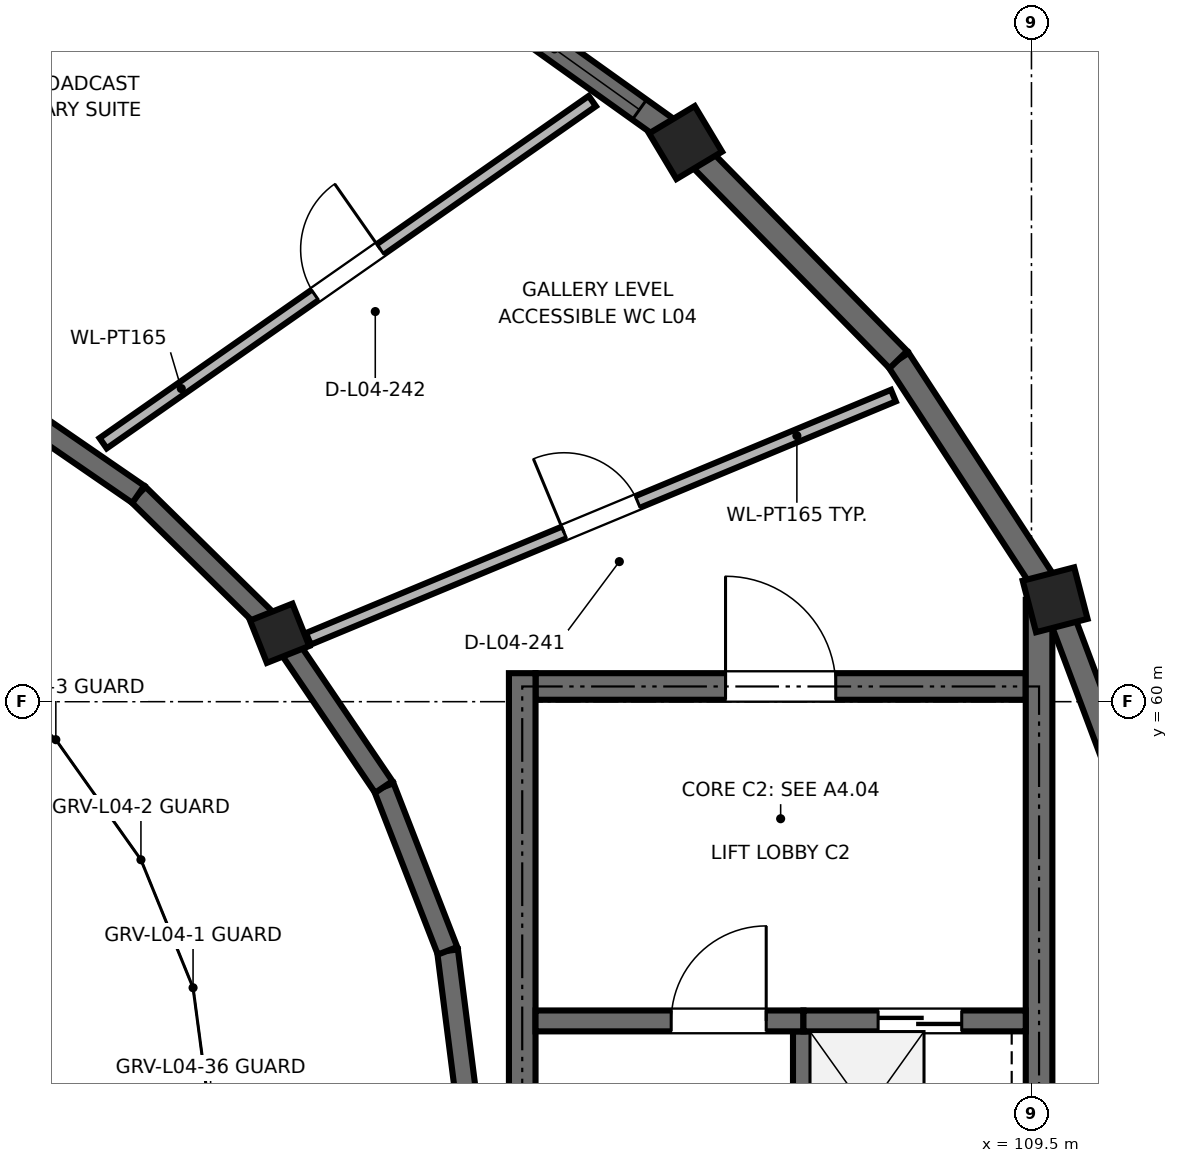
"""IFC4 building model, lengths in metres.
Left out: names, types, materials, properties, quantities, classifications, styles, units other than length and angle.
Written with IfcOpenShell. Run it as: python <this file> out.ifc"""

import sys

from ifc_helpers import new_model, si_unit, direction, frame, frame_2d, origin, origin_2d, place, context, subcontext, project, spatial, rectangle, circle, extrude, element, fill, save


model = new_model("IFC4")
c1 = context("Model", 3, precision=1e-05, world=origin(), true_north=direction((0.0, 1.0)))
c2 = subcontext(c1, "Body", "Model", "MODEL_VIEW")
j1 = project(units=[si_unit("LENGTHUNIT", "METRE"), si_unit("PLANEANGLEUNIT", "RADIAN")], contexts=[c1])
p1 = place(None, origin())
s1 = spatial("IfcSite", under=j1, at=p1, CompositionType="ELEMENT")
p2 = place(p1, origin())
s2 = spatial("IfcBuilding", under=s1, at=p2, CompositionType="ELEMENT")
p3 = place(p2, frame((0.0, 0.0, 18.6)))
s3 = spatial("IfcBuildingStorey", under=s2, at=p3, CompositionType="ELEMENT", Elevation=18.6)
for number, where, z_axis, x_axis in (
    (1, (109.811, 61.34, 0.0), (0.0, 0.0, 1.0), (0.968, 0.252, 0.0)),
    (2, (104.949, 67.356, 0.0), (0.0, 0.0, 1.0), (0.858, 0.514, 0.0)),
):
    element("IfcColumn", number, at=place(p3, frame(where, z_axis=z_axis, x_axis=x_axis)), inside=s3, PredefinedType="COLUMN", context=c2, shape_type="SweptSolid", body=[
        extrude(rectangle(XDim=0.7, YDim=0.7, at=origin_2d()), origin(), (0.0, 0.0, 1.0), 4.2),
    ])
p4 = place(p3, frame((99.608, 60.9, 0.0), z_axis=(0.0, 0.0, 1.0), x_axis=(0.929326043111, 0.369260213935, 0.0)))
e3 = element("IfcColumn", 3, at=p4, inside=s3, PredefinedType="COLUMN", context=c2, shape_type="SweptSolid", body=[
    extrude(circle(Radius=0.3, at=origin_2d()), origin(), (0.0, 0.0, 1.0), 4.2),
])
p5 = place(p3, frame((111.075, 57.973, 0.0), z_axis=(0.0, 0.0, 1.0), x_axis=(-0.351279653979, 0.936270583058, 0.0)))
e4 = element("IfcWall", 4, at=p5, inside=s3, PredefinedType="SHEAR", context=c2, shape_type="SweptSolid", body=[
    extrude(rectangle(XDim=3.597, YDim=0.325, at=frame_2d((1.798, 0.0))), origin(), (0.0, 0.0, 1.0), 3.98),
])
p6 = place(p3, frame((109.811, 61.34, 0.0), z_axis=(0.0, 0.0, 1.0), x_axis=(-0.546611158382, 0.837386554425, 0.0)))
e5 = element("IfcWall", 5, at=p6, inside=s3, PredefinedType="SHEAR", context=c2, shape_type="SweptSolid", body=[
    extrude(rectangle(XDim=3.773, YDim=0.325, at=frame_2d((1.887, 0.0))), origin(), (0.0, 0.0, 1.0), 3.98),
])
p7 = place(p3, frame((107.749, 64.5, 0.0), z_axis=(0.0, 0.0, 1.0), x_axis=(-0.700051268358, 0.714092586203, 0.0)))
e6 = element("IfcWall", 6, at=p7, inside=s3, PredefinedType="SHEAR", context=c2, shape_type="SweptSolid", body=[
    extrude(rectangle(XDim=3.999, YDim=0.325, at=frame_2d((2.0, 0.0))), origin(), (0.0, 0.0, 1.0), 3.98),
])
p8 = place(p3, frame((104.949, 67.356, 0.0), z_axis=(0.0, 0.0, 1.0), x_axis=(-0.813737360708, 0.581232748378, 0.0)))
e7 = element("IfcWall", 7, at=p8, inside=s3, PredefinedType="SHEAR", context=c2, shape_type="SweptSolid", body=[
    extrude(rectangle(XDim=4.241, YDim=0.325, at=frame_2d((2.121, 0.0))), origin(), (0.0, 0.0, 1.0), 3.98),
])
p9 = place(p8, frame((0.746, 0.0, 1.45)))
e8 = element("IfcOpeningElement", 8, at=p9, cuts=e7, PredefinedType="OPENING", context=c2, shape_type="SweptSolid", body=[
    extrude(rectangle(XDim=2.75, YDim=1.15, at=frame_2d((1.375, 0.575))), frame((0.0, 0.172, 0.0), z_axis=(0.0, -1.0, 0.0), x_axis=(1.0, 0.0, 0.0)), (0.0, 0.0, 1.0), 0.345),
])
p10 = place(p3, frame((102.1, 54.5, 0.0), z_axis=(0.0, 0.0, 1.0), x_axis=(-0.126180195213, 0.992007337844, 0.0)))
e9 = element("IfcWall", 9, at=p10, inside=s3, PredefinedType="SHEAR", context=c2, shape_type="SweptSolid", body=[
    extrude(rectangle(XDim=2.24, YDim=0.275, at=frame_2d((1.12, 0.0))), origin(), (0.0, 0.0, 1.0), 3.98),
])
p11 = place(p3, frame((101.817, 56.723, 0.0), z_axis=(0.0, 0.0, 1.0), x_axis=(-0.362802811216, 0.931865934657, 0.0)))
e10 = element("IfcWall", 10, at=p11, inside=s3, PredefinedType="SHEAR", context=c2, shape_type="SweptSolid", body=[
    extrude(rectangle(XDim=2.313, YDim=0.275, at=frame_2d((1.156, 0.0))), origin(), (0.0, 0.0, 1.0), 3.98),
])
p12 = place(p3, frame((100.978, 58.878, 0.0), z_axis=(0.0, 0.0, 1.0), x_axis=(-0.560958648975, 0.827843822312, 0.0)))
e11 = element("IfcWall", 11, at=p12, inside=s3, PredefinedType="SHEAR", context=c2, shape_type="SweptSolid", body=[
    extrude(rectangle(XDim=2.442, YDim=0.275, at=frame_2d((1.221, 0.0))), origin(), (0.0, 0.0, 1.0), 3.98),
])
p13 = place(p3, frame((99.608, 60.9, 0.0), z_axis=(0.0, 0.0, 1.0), x_axis=(-0.713212431679, 0.700947949065, 0.0)))
e12 = element("IfcWall", 12, at=p13, inside=s3, PredefinedType="SHEAR", context=c2, shape_type="SweptSolid", body=[
    extrude(rectangle(XDim=2.608, YDim=0.275, at=frame_2d((1.304, 0.0))), origin(), (0.0, 0.0, 1.0), 3.98),
])
p14 = place(p3, frame((97.748, 62.728, 0.0), z_axis=(0.0, 0.0, 1.0), x_axis=(-0.823780742291, 0.566908536388, 0.0)))
e13 = element("IfcWall", 13, at=p14, inside=s3, PredefinedType="SHEAR", context=c2, shape_type="SweptSolid", body=[
    extrude(rectangle(XDim=2.783, YDim=0.275, at=frame_2d((1.392, 0.0))), origin(), (0.0, 0.0, 1.0), 3.98),
])
p15 = place(p3, frame((102.975, 60.2, 0.0), z_axis=(0.0, 0.0, 1.0), x_axis=(1.0, 0.0, 0.0)))
e14 = element("IfcWall", 14, at=p15, inside=s3, PredefinedType="SHEAR", context=c2, shape_type="SweptSolid", body=[
    extrude(rectangle(XDim=6.45, YDim=0.35, at=frame_2d((3.225, 0.0))), origin(), (0.0, 0.0, 1.0), 3.98),
])
p16 = place(p15, frame((2.5, 0.0, 0.0)))
e15 = element("IfcOpeningElement", 15, at=p16, cuts=e14, PredefinedType="OPENING", context=c2, shape_type="SweptSolid", body=[
    extrude(rectangle(XDim=1.45, YDim=2.2, at=frame_2d((0.725, 1.1))), frame((0.0, 0.185, 0.0), z_axis=(0.0, -1.0, 0.0), x_axis=(1.0, 0.0, 0.0)), (0.0, 0.0, 1.0), 0.37),
])
p17 = place(p3, frame((102.8, 48.775, 0.0), z_axis=(0.0, 0.0, 1.0), x_axis=(0.0, 1.0, 0.0)))
e16 = element("IfcWall", 16, at=p17, inside=s3, PredefinedType="SHEAR", context=c2, shape_type="SweptSolid", body=[
    extrude(rectangle(XDim=11.6, YDim=0.35, at=frame_2d((5.8, 0.0))), origin(), (0.0, 0.0, 1.0), 3.98),
])
p18 = place(p3, frame((109.6, 48.775, 0.0), z_axis=(0.0, 0.0, 1.0), x_axis=(0.0, 1.0, 0.0)))
e17 = element("IfcWall", 17, at=p18, inside=s3, PredefinedType="SHEAR", context=c2, shape_type="SweptSolid", body=[
    extrude(rectangle(XDim=12.565, YDim=0.35, at=frame_2d((6.283, 0.0))), origin(), (0.0, 0.0, 1.0), 3.98),
])
p19 = place(p3, frame((106.5, 48.775, 0.0), z_axis=(0.0, 0.0, 1.0), x_axis=(0.0, 1.0, 0.0)))
e18 = element("IfcWall", 18, at=p19, inside=s3, PredefinedType="SHEAR", context=c2, shape_type="SweptSolid", body=[
    extrude(rectangle(XDim=6.888, YDim=0.275, at=frame_2d((3.444, 0.0))), origin(), (0.0, 0.0, 1.0), 3.98),
])
p20 = place(p3, frame((102.975, 55.8, 0.0), z_axis=(0.0, 0.0, 1.0), x_axis=(1.0, 0.0, 0.0)))
e19 = element("IfcWall", 19, at=p20, inside=s3, PredefinedType="SHEAR", context=c2, shape_type="SweptSolid", body=[
    extrude(rectangle(XDim=3.525, YDim=0.275, at=frame_2d((1.762, 0.0))), origin(), (0.0, 0.0, 1.0), 3.98),
])
p21 = place(p20, frame((1.785, 0.0, 0.0)))
e20 = element("IfcOpeningElement", 20, at=p21, cuts=e19, PredefinedType="OPENING", context=c2, shape_type="SweptSolid", body=[
    extrude(rectangle(XDim=1.25, YDim=2.15, at=frame_2d((0.625, 1.075))), frame((0.0, 0.147, 0.0), z_axis=(0.0, -1.0, 0.0), x_axis=(1.0, 0.0, 0.0)), (0.0, 0.0, 1.0), 0.295),
])
p22 = place(p3, frame((106.5, 55.8, 0.0), z_axis=(0.0, 0.0, 1.0), x_axis=(1.0, 0.0, 0.0)))
e21 = element("IfcWall", 21, at=p22, inside=s3, PredefinedType="SHEAR", context=c2, shape_type="SweptSolid", body=[
    extrude(rectangle(XDim=2.925, YDim=0.275, at=frame_2d((1.462, 0.0))), origin(), (0.0, 0.0, 1.0), 3.98),
])
p23 = place(p22, frame((0.982, 0.0, 0.0)))
e22 = element("IfcOpeningElement", 22, at=p23, cuts=e21, PredefinedType="OPENING", context=c2, shape_type="SweptSolid", body=[
    extrude(rectangle(XDim=1.1, YDim=2.15, at=frame_2d((0.55, 1.075))), frame((0.0, 0.147, 0.0), z_axis=(0.0, -1.0, 0.0), x_axis=(1.0, 0.0, 0.0)), (0.0, 0.0, 1.0), 0.295),
])
p24 = place(p3, frame((99.987, 60.827, 0.0), z_axis=(0.0, 0.0, 1.0), x_axis=(0.923382534701, 0.383881094363, 0.0)))
e23 = element("IfcWall", 23, at=p24, inside=s3, PredefinedType="PARTITIONING", context=c2, shape_type="SweptSolid", body=[
    extrude(rectangle(XDim=8.335, YDim=0.165, at=frame_2d((4.167, 0.0))), origin(), (0.0, 0.0, 1.0), 3.52),
])
p25 = place(p24, frame((3.643, 0.0, 0.0)))
e24 = element("IfcOpeningElement", 24, at=p25, cuts=e23, PredefinedType="OPENING", context=c2, shape_type="SweptSolid", body=[
    extrude(rectangle(XDim=1.05, YDim=2.15, at=frame_2d((0.525, 1.075))), frame((0.0, 0.093, 0.0), z_axis=(0.0, -1.0, 0.0), x_axis=(1.0, 0.0, 0.0)), (0.0, 0.0, 1.0), 0.185),
])
p26 = place(p3, frame((97.286, 63.4, 0.0), z_axis=(0.0, 0.0, 1.0), x_axis=(0.819471352116, 0.573120147142, 0.0)))
e25 = element("IfcWall", 25, at=p26, inside=s3, PredefinedType="PARTITIONING", context=c2, shape_type="SweptSolid", body=[
    extrude(rectangle(XDim=7.854, YDim=0.165, at=frame_2d((3.927, 0.0))), origin(), (0.0, 0.0, 1.0), 3.974),
])
p27 = place(p26, frame((3.402, 0.0, 0.0)))
e26 = element("IfcOpeningElement", 26, at=p27, cuts=e25, PredefinedType="OPENING", context=c2, shape_type="SweptSolid", body=[
    extrude(rectangle(XDim=1.05, YDim=2.15, at=frame_2d((0.525, 1.075))), frame((0.0, 0.093, 0.0), z_axis=(0.0, -1.0, 0.0), x_axis=(1.0, 0.0, 0.0)), (0.0, 0.0, 1.0), 0.185),
])
p28 = place(p9, origin())
e27 = element("IfcWindow", 27, at=p28, inside=s3, PartitioningType="SINGLE_PANEL", PredefinedType="WINDOW", context=c2, shape_type="SweptSolid", body=[
    extrude(rectangle(XDim=2.75, YDim=1.15, at=frame_2d((1.375, 0.575))), frame((0.0, 0.03, 0.0), z_axis=(0.0, -1.0, 0.0), x_axis=(1.0, 0.0, 0.0)), (0.0, 0.0, 1.0), 0.06),
])
fill(e8, e27)
p29 = place(p21, origin())
e28 = element("IfcDoor", 28, at=p29, inside=s3, OperationType="SINGLE_SWING_RIGHT", PredefinedType="DOOR", context=c2, shape_type="SweptSolid", body=[
    extrude(rectangle(XDim=1.25, YDim=2.15, at=frame_2d((0.625, 1.075))), frame((0.0, 0.025, 0.0), z_axis=(0.0, -1.0, 0.0), x_axis=(1.0, 0.0, 0.0)), (0.0, 0.0, 1.0), 0.05),
])
fill(e20, e28)
p30 = place(p23, origin())
e29 = element("IfcDoor", 29, at=p30, inside=s3, OperationType="DOUBLE_DOOR_SLIDING", PredefinedType="DOOR", context=c2, shape_type="SweptSolid", body=[
    extrude(rectangle(XDim=1.1, YDim=2.15, at=frame_2d((0.55, 1.075))), frame((0.0, 0.025, 0.0), z_axis=(0.0, -1.0, 0.0), x_axis=(1.0, 0.0, 0.0)), (0.0, 0.0, 1.0), 0.05),
])
fill(e22, e29)
p31 = place(p16, origin())
e30 = element("IfcDoor", 30, at=p31, inside=s3, OperationType="SINGLE_SWING_LEFT", PredefinedType="DOOR", context=c2, shape_type="SweptSolid", body=[
    extrude(rectangle(XDim=1.45, YDim=2.2, at=frame_2d((0.725, 1.1))), frame((0.0, 0.025, 0.0), z_axis=(0.0, -1.0, 0.0), x_axis=(1.0, 0.0, 0.0)), (0.0, 0.0, 1.0), 0.05),
])
fill(e15, e30)
p32 = place(p25, origin())
e31 = element("IfcDoor", 31, at=p32, inside=s3, OperationType="SINGLE_SWING_LEFT", PredefinedType="DOOR", context=c2, shape_type="SweptSolid", body=[
    extrude(rectangle(XDim=1.05, YDim=2.15, at=frame_2d((0.525, 1.075))), frame((0.0, 0.025, 0.0), z_axis=(0.0, -1.0, 0.0), x_axis=(1.0, 0.0, 0.0)), (0.0, 0.0, 1.0), 0.05),
])
fill(e24, e31)
p33 = place(p27, origin())
e32 = element("IfcDoor", 32, at=p33, inside=s3, OperationType="SINGLE_SWING_RIGHT", PredefinedType="DOOR", context=c2, shape_type="SweptSolid", body=[
    extrude(rectangle(XDim=1.05, YDim=2.15, at=frame_2d((0.525, 1.075))), frame((0.0, 0.025, 0.0), z_axis=(0.0, -1.0, 0.0), x_axis=(1.0, 0.0, 0.0)), (0.0, 0.0, 1.0), 0.05),
])
fill(e26, e32)
save(model, sys.argv[1])
